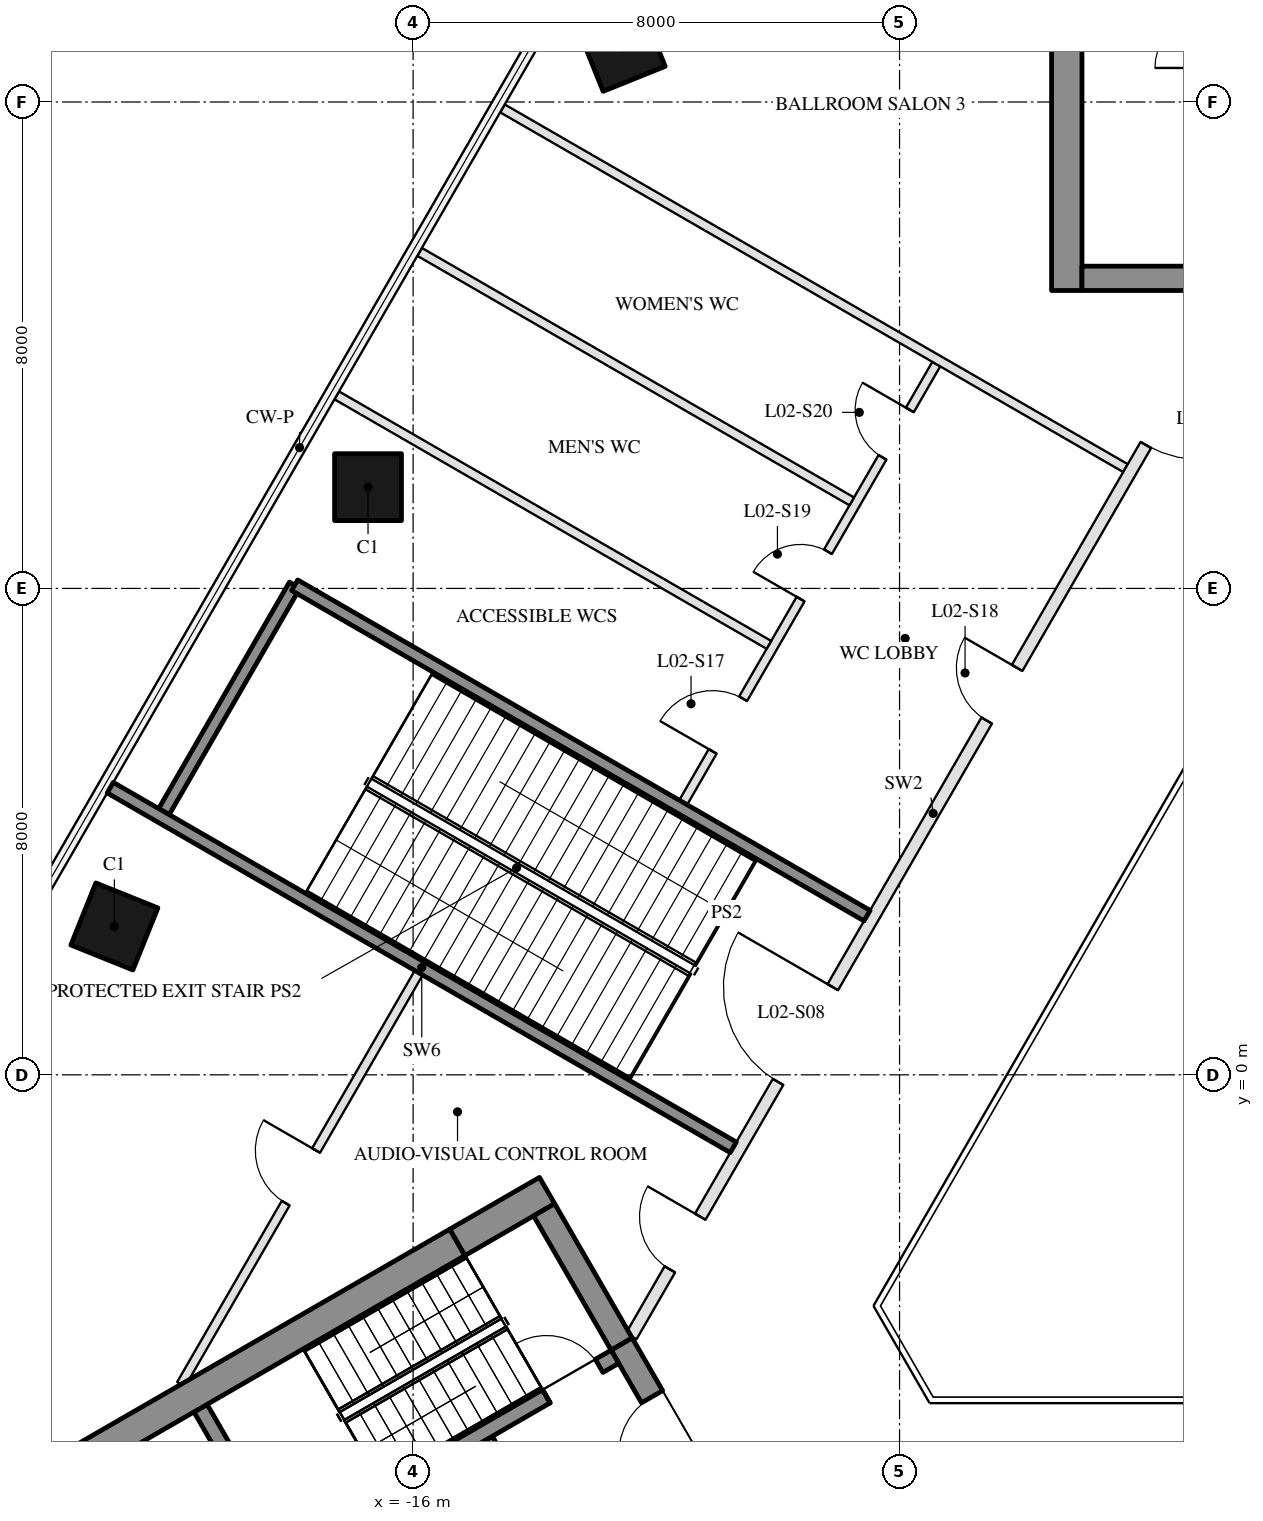
"""IFC4 building model, lengths in metres.
Left out: names, types, materials, properties, quantities, classifications, styles, units other than length and angle.
Written with IfcOpenShell. Run it as: python <this file> out.ifc"""

import sys

from ifc_helpers import new_model, si_unit, direction, frame, frame_2d, origin, origin_2d, place, context, subcontext, project, spatial, rectangle, hollow_rectangle, extrude, boolean, halfspace, element, fill, save


model = new_model("IFC4")
c1 = context("Model", 3, precision=1e-05, world=origin(), true_north=direction((0.0, 1.0)))
c2 = subcontext(c1, "Body", "Model", "MODEL_VIEW")
j1 = project(units=[si_unit("LENGTHUNIT", "METRE"), si_unit("PLANEANGLEUNIT", "RADIAN")], contexts=[c1])
p1 = place(None, origin())
s1 = spatial("IfcSite", under=j1, at=p1, CompositionType="ELEMENT")
p2 = place(p1, origin())
s2 = spatial("IfcBuilding", under=s1, at=p2, CompositionType="ELEMENT")
p3 = place(p2, frame((0.0, 0.0, 15.5)))
s3 = spatial("IfcBuildingStorey", under=s2, at=p3, CompositionType="ELEMENT", Elevation=15.5)
p4 = place(p3, frame((-12.57, 16.891, 0.0), z_axis=(0.054232459867, -0.069219344797, 0.996126258364), x_axis=(0.500873253526, 0.864897735693, 0.032831245724)))
e1 = element("IfcColumn", 1, at=p4, inside=s3, PredefinedType="COLUMN", context=c2, shape_type="SweptSolid", body=[
    boolean("DIFFERENCE", boolean("DIFFERENCE", extrude(hollow_rectangle(XDim=1.1, YDim=1.1, WallThickness=0.05, at=origin_2d()), origin(), (0.0, 0.0, 1.0), 8.031), halfspace(frame((0.0, 0.0, 0.016), z_axis=(0.0, 0.0, 1.0), x_axis=(1.0, 0.0, 0.0)), True)), halfspace(frame((0.0, 0.0, 8.017), z_axis=(0.0, 0.0, 1.0), x_axis=(1.0, 0.0, 0.0)), False)),
])
p5 = place(p3, frame((-16.741, 9.666, 0.0), z_axis=(0.070716365811, -0.040848206144, 0.996659731133), x_axis=(-0.500184519903, -0.865918844956, 0.0)))
e2 = element("IfcColumn", 2, at=p5, inside=s3, PredefinedType="COLUMN", context=c2, shape_type="SweptSolid", body=[
    boolean("DIFFERENCE", boolean("DIFFERENCE", extrude(hollow_rectangle(XDim=1.1, YDim=1.1, WallThickness=0.05, at=origin_2d()), origin(), (0.0, 0.0, 1.0), 8.027), halfspace(frame((0.0, 0.0, 0.015), z_axis=(0.0, 0.0, 1.0), x_axis=(1.0, 0.0, 0.0)), True)), halfspace(frame((0.0, 0.0, 8.013), z_axis=(0.0, 0.0, 1.0), x_axis=(1.0, 0.0, 0.0)), False)),
])
p6 = place(p3, frame((-20.913, 2.44, 0.0), z_axis=(0.087093940596, -0.012342108161, 0.996123645878), x_axis=(-0.498471453495, -0.866283513655, 0.032849414298)))
e3 = element("IfcColumn", 3, at=p6, inside=s3, PredefinedType="COLUMN", context=c2, shape_type="SweptSolid", body=[
    boolean("DIFFERENCE", boolean("DIFFERENCE", extrude(hollow_rectangle(XDim=1.1, YDim=1.1, WallThickness=0.05, at=origin_2d()), origin(), (0.0, 0.0, 1.0), 8.031), halfspace(frame((0.0, 0.0, 0.016), z_axis=(0.0, 0.0, 1.0), x_axis=(1.0, 0.0, 0.0)), True)), halfspace(frame((0.0, 0.0, 8.017), z_axis=(0.0, 0.0, 1.0), x_axis=(1.0, 0.0, 0.0)), False)),
])
p7 = place(p3, frame((-5.25, 12.9, 0.0), z_axis=(0.0, 0.0, 1.0), x_axis=(0.0, 1.0, 0.0)))
e4 = element("IfcWall", 4, at=p7, inside=s3, PredefinedType="SHEAR", context=c2, shape_type="SweptSolid", body=[
    extrude(rectangle(XDim=15.6, YDim=0.5, at=frame_2d((7.8, 0.0))), origin(), (0.0, 0.0, 1.0), 7.7),
])
p8 = place(p3, frame((2.45, 13.1, 0.0), z_axis=(0.0, 0.0, 1.0), x_axis=(-1.0, 0.0, 0.0)))
e5 = element("IfcWall", 5, at=p8, inside=s3, PredefinedType="SHEAR", context=c2, shape_type="SweptSolid", body=[
    extrude(rectangle(XDim=7.45, YDim=0.4, at=frame_2d((3.725, 0.0))), origin(), (0.0, 0.0, 1.0), 7.7),
])
p9 = place(p8, frame((1.0, 0.0, 0.0)))
e6 = element("IfcOpeningElement", 6, at=p9, cuts=e5, PredefinedType="OPENING", context=c2, shape_type="SweptSolid", body=[
    extrude(rectangle(XDim=1.1, YDim=2.1, at=frame_2d((0.55, 1.05))), frame((0.0, 0.21, 0.0), z_axis=(0.0, -1.0, 0.0), x_axis=(1.0, 0.0, 0.0)), (0.0, 0.0, 1.0), 0.42),
])
p10 = place(p8, frame((3.3, 0.0, 0.0)))
e7 = element("IfcOpeningElement", 7, at=p10, cuts=e5, PredefinedType="OPENING", context=c2, shape_type="SweptSolid", body=[
    extrude(rectangle(XDim=1.4, YDim=2.1, at=frame_2d((0.7, 1.05))), frame((0.0, 0.21, 0.0), z_axis=(0.0, -1.0, 0.0), x_axis=(1.0, 0.0, 0.0)), (0.0, 0.0, 1.0), 0.42),
])
p11 = place(p3, frame((-19.496, -5.482, 0.0), z_axis=(0.0, 0.0, 1.0), x_axis=(0.499990435942, -0.866030925526, 0.0)))
e8 = element("IfcWall", 8, at=p11, inside=s3, PredefinedType="SHEAR", context=c2, shape_type="SweptSolid", body=[
    extrude(rectangle(XDim=2.55, YDim=0.25, at=frame_2d((1.275, 0.0))), origin(), (0.0, 0.0, 1.0), 7.7),
])
p12 = place(p3, frame((-14.783, -5.995, 0.0), z_axis=(0.0, 0.0, 1.0), x_axis=(0.49994636267, -0.866056369097, 0.0)))
e9 = element("IfcWall", 9, at=p12, inside=s3, PredefinedType="SHEAR", context=c2, shape_type="SweptSolid", body=[
    extrude(rectangle(XDim=2.8, YDim=0.2, at=frame_2d((1.4, 0.0))), origin(), (0.0, 0.0, 1.0), 7.7),
])
p13 = place(p12, frame((0.7, 0.0, 0.0)))
e10 = element("IfcOpeningElement", 10, at=p13, cuts=e9, PredefinedType="OPENING", context=c2, shape_type="SweptSolid", body=[
    extrude(rectangle(XDim=1.2, YDim=2.1, at=frame_2d((0.6, 1.05))), frame((0.0, 0.11, 0.0), z_axis=(0.0, -1.0, 0.0), x_axis=(1.0, 0.0, 0.0)), (0.0, 0.0, 1.0), 0.22),
])
p14 = place(p3, frame((-13.797, -1.903, 0.0), z_axis=(0.0, 0.0, 1.0), x_axis=(-0.866033076574, -0.499986710104, 0.0)))
e11 = element("IfcWall", 11, at=p14, inside=s3, PredefinedType="SHEAR", context=c2, shape_type="SweptSolid", body=[
    extrude(rectangle(XDim=1.706, YDim=0.5, at=frame_2d((0.853, 0.0))), origin(), (0.0, 0.0, 1.0), 7.7),
])
p15 = place(p3, frame((-15.274, -2.756, 0.0), z_axis=(0.0, 0.0, 1.0), x_axis=(-0.86602318214, -0.500003847982, 0.0)))
e12 = element("IfcWall", 12, at=p15, inside=s3, PredefinedType="SHEAR", context=c2, shape_type="SweptSolid", body=[
    extrude(rectangle(XDim=13.894, YDim=0.5, at=frame_2d((6.947, 0.0))), origin(), (0.0, 0.0, 1.0), 7.7),
])
p16 = place(p3, frame((-13.845, -2.22, 0.0), z_axis=(0.0, 0.0, 1.0), x_axis=(0.500062241894, -0.865989465428, 0.0)))
e13 = element("IfcWall", 13, at=p16, inside=s3, PredefinedType="SHEAR", context=c2, shape_type="SweptSolid", body=[
    extrude(rectangle(XDim=2.55, YDim=0.4, at=frame_2d((1.275, 0.0))), origin(), (0.0, 0.0, 1.0), 7.7),
])
p17 = place(p3, frame((-12.57, -4.428, 0.0), z_axis=(0.0, 0.0, 1.0), x_axis=(0.499984378957, -0.86603442241, 0.0)))
e14 = element("IfcWall", 14, at=p17, inside=s3, PredefinedType="SHEAR", context=c2, shape_type="SweptSolid", body=[
    extrude(rectangle(XDim=7.45, YDim=0.4, at=frame_2d((3.725, 0.0))), origin(), (0.0, 0.0, 1.0), 7.7),
])
p18 = place(p17, frame((1.0, 0.0, 0.0)))
e15 = element("IfcOpeningElement", 15, at=p18, cuts=e14, PredefinedType="OPENING", context=c2, shape_type="SweptSolid", body=[
    extrude(rectangle(XDim=1.1, YDim=2.1, at=frame_2d((0.55, 1.05))), frame((0.0, 0.21, 0.0), z_axis=(0.0, -1.0, 0.0), x_axis=(1.0, 0.0, 0.0)), (0.0, 0.0, 1.0), 0.42),
])
p19 = place(p17, frame((3.3, 0.0, 0.0)))
e16 = element("IfcOpeningElement", 16, at=p19, cuts=e14, PredefinedType="OPENING", context=c2, shape_type="SweptSolid", body=[
    extrude(rectangle(XDim=1.4, YDim=2.1, at=frame_2d((0.7, 1.05))), frame((0.0, 0.21, 0.0), z_axis=(0.0, -1.0, 0.0), x_axis=(1.0, 0.0, 0.0)), (0.0, 0.0, 1.0), 0.42),
])
p20 = place(p3, frame((-12.681, -4.636, 0.0), z_axis=(0.0, 0.0, 1.0), x_axis=(-0.86601437931, -0.500019094464, 0.0)))
e17 = element("IfcWall", 17, at=p20, inside=s3, PredefinedType="SHEAR", context=c2, shape_type="SweptSolid", body=[
    extrude(rectangle(XDim=1.306, YDim=0.25, at=frame_2d((0.653, 0.0))), origin(), (0.0, 0.0, 1.0), 7.7),
])
p21 = place(p20, frame((0.3, 0.0, 0.0)))
e18 = element("IfcOpeningElement", 18, at=p21, cuts=e17, PredefinedType="OPENING", context=c2, shape_type="SweptSolid", body=[
    extrude(rectangle(XDim=1.0, YDim=2.1, at=frame_2d((0.5, 1.05))), frame((0.0, 0.135, 0.0), z_axis=(0.0, -1.0, 0.0), x_axis=(1.0, 0.0, 0.0)), (0.0, 0.0, 1.0), 0.27),
])
p22 = place(p3, frame((-13.812, -5.29, 0.0), z_axis=(0.0, 0.0, 1.0), x_axis=(-0.866023561601, -0.500003190742, 0.0)))
e19 = element("IfcWall", 19, at=p22, inside=s3, PredefinedType="SHEAR", context=c2, shape_type="SweptSolid", body=[
    extrude(rectangle(XDim=5.144, YDim=0.25, at=frame_2d((2.572, 0.0))), origin(), (0.0, 0.0, 1.0), 7.7),
])
p23 = place(p3, frame((-17.948, 8.053, 0.0), z_axis=(0.0, 0.0, 1.0), x_axis=(-0.500028799954, -0.866008775485, 0.0)))
e20 = element("IfcWall", 20, at=p23, inside=s3, PredefinedType="SOLIDWALL", context=c2, shape_type="SweptSolid", body=[
    extrude(rectangle(XDim=4.3, YDim=0.2, at=frame_2d((2.15, 0.0))), origin(), (0.0, 0.0, 1.0), 7.7),
])
p24 = place(p3, frame((-15.908, 1.679, 0.0), z_axis=(0.0, 0.0, 1.0), x_axis=(-0.49997934671, -0.866037327638, 0.0)))
e21 = element("IfcWall", 21, at=p24, inside=s3, PredefinedType="PARTITIONING", context=c2, shape_type="SweptSolid", body=[
    extrude(rectangle(XDim=7.815, YDim=0.15, at=frame_2d((3.908, 0.0))), origin(), (0.0, 0.0, 1.0), 6.91),
])
p25 = place(p24, frame((3.375, 0.0, 0.0)))
e22 = element("IfcOpeningElement", 22, at=p25, cuts=e21, PredefinedType="OPENING", context=c2, shape_type="SweptSolid", body=[
    extrude(rectangle(XDim=1.0, YDim=2.1, at=frame_2d((0.5, 1.05))), frame((0.0, 0.085, 0.0), z_axis=(0.0, -1.0, 0.0), x_axis=(1.0, 0.0, 0.0)), (0.0, 0.0, 1.0), 0.17),
])
p26 = place(p3, frame((-7.396, 11.689, 0.0), z_axis=(0.0, 0.0, 1.0), x_axis=(-0.500005920892, -0.866021985329, 0.0)))
e23 = element("IfcWall", 23, at=p26, inside=s3, PredefinedType="PARTITIONING", context=c2, shape_type="SweptSolid", body=[
    extrude(rectangle(XDim=8.325, YDim=0.15, at=frame_2d((4.163, 0.0))), origin(), (0.0, 0.0, 1.0), 6.91),
])
p27 = place(p26, frame((6.354, 0.0, 0.0)))
e24 = element("IfcOpeningElement", 24, at=p27, cuts=e23, PredefinedType="OPENING", context=c2, shape_type="SweptSolid", body=[
    extrude(rectangle(XDim=1.0, YDim=2.1, at=frame_2d((0.5, 1.05))), frame((0.0, 0.085, 0.0), z_axis=(0.0, -1.0, 0.0), x_axis=(1.0, 0.0, 0.0)), (0.0, 0.0, 1.0), 0.17),
])
p28 = place(p26, frame((3.562, 0.0, 0.0)))
e25 = element("IfcOpeningElement", 25, at=p28, cuts=e23, PredefinedType="OPENING", context=c2, shape_type="SweptSolid", body=[
    extrude(rectangle(XDim=0.9, YDim=2.1, at=frame_2d((0.45, 1.05))), frame((0.0, 0.085, 0.0), z_axis=(0.0, -1.0, 0.0), x_axis=(1.0, 0.0, 0.0)), (0.0, 0.0, 1.0), 0.17),
])
p29 = place(p26, frame((0.871, 0.0, 0.0)))
e26 = element("IfcOpeningElement", 26, at=p29, cuts=e23, PredefinedType="OPENING", context=c2, shape_type="SweptSolid", body=[
    extrude(rectangle(XDim=0.9, YDim=2.1, at=frame_2d((0.45, 1.05))), frame((0.0, 0.085, 0.0), z_axis=(0.0, -1.0, 0.0), x_axis=(1.0, 0.0, 0.0)), (0.0, 0.0, 1.0), 0.17),
])
p30 = place(p3, frame((-14.531, 15.895, 0.0), z_axis=(0.0, 0.0, 1.0), x_axis=(0.866032672044, -0.499987410794, 0.0)))
e27 = element("IfcWall", 27, at=p30, inside=s3, PredefinedType="PARTITIONING", context=c2, shape_type="SweptSolid", body=[
    extrude(rectangle(XDim=11.831, YDim=0.15, at=frame_2d((5.916, 0.0))), origin(), (0.0, 0.0, 1.0), 7.1),
])
for number, where, z_axis, x_axis in (
    (28, (-15.893, 13.535, 0.0), (0.0, 0.0, 1.0), (0.866, -0.5, 0.0)),
    (29, (-17.256, 11.175, 0.0), (0.0, 0.0, 1.0), (0.866, -0.5, 0.0)),
):
    element("IfcWall", number, at=place(p3, frame(where, z_axis=z_axis, x_axis=x_axis)), inside=s3, PredefinedType="PARTITIONING", context=c2, shape_type="SweptSolid", body=[
        extrude(rectangle(XDim=8.207, YDim=0.15, at=frame_2d((4.104, 0.0))), origin(), (0.0, 0.0, 1.0), 7.1),
    ])
p31 = place(p3, frame((-17.948, 8.053, 0.0), z_axis=(0.0, 0.0, 1.0), x_axis=(0.86602026553, -0.500008899612, 0.0)))
e30 = element("IfcWall", 30, at=p31, inside=s3, PredefinedType="SOLIDWALL", context=c2, shape_type="SweptSolid", body=[
    extrude(rectangle(XDim=10.87, YDim=0.2, at=frame_2d((5.435, 0.0))), origin(), (0.0, 0.0, 1.0), 7.7),
])
p32 = place(p3, frame((-20.981, 4.723, 0.0), z_axis=(0.0, 0.0, 1.0), x_axis=(0.866023736906, -0.500002887107, 0.0)))
e31 = element("IfcWall", 31, at=p32, inside=s3, PredefinedType="SOLIDWALL", context=c2, shape_type="SweptSolid", body=[
    extrude(rectangle(XDim=11.832, YDim=0.2, at=frame_2d((5.916, 0.0))), origin(), (0.0, 0.0, 1.0), 7.7),
])
p33 = place(p3, frame((-2.482, 12.9, 0.0), z_axis=(0.0, 0.0, 1.0), x_axis=(-0.50000478328, -0.866022642139, 0.0)))
e32 = element("IfcWall", 32, at=p33, inside=s3, PredefinedType="PARTITIONING", context=c2, shape_type="SweptSolid", body=[
    extrude(rectangle(XDim=19.861, YDim=0.2, at=frame_2d((9.931, 0.0))), origin(), (0.0, 0.0, 1.0), 6.91),
])
p34 = place(p33, frame((13.23, 0.0, 0.0)))
e33 = element("IfcOpeningElement", 33, at=p34, cuts=e32, PredefinedType="OPENING", context=c2, shape_type="SweptSolid", body=[
    extrude(rectangle(XDim=1.8, YDim=2.1, at=frame_2d((0.9, 1.05))), frame((0.0, 0.11, 0.0), z_axis=(0.0, -1.0, 0.0), x_axis=(1.0, 0.0, 0.0)), (0.0, 0.0, 1.0), 0.22),
])
p35 = place(p33, frame((1.134, 0.0, 0.0)))
e34 = element("IfcOpeningElement", 34, at=p35, cuts=e32, PredefinedType="OPENING", context=c2, shape_type="SweptSolid", body=[
    extrude(rectangle(XDim=1.8, YDim=2.4, at=frame_2d((0.9, 1.2))), frame((0.0, 0.11, 0.0), z_axis=(0.0, -1.0, 0.0), x_axis=(1.0, 0.0, 0.0)), (0.0, 0.0, 1.0), 0.22),
])
p36 = place(p33, frame((17.59, 0.0, 0.0)))
e35 = element("IfcOpeningElement", 35, at=p36, cuts=e32, PredefinedType="OPENING", context=c2, shape_type="SweptSolid", body=[
    extrude(rectangle(XDim=1.0, YDim=2.1, at=frame_2d((0.5, 1.05))), frame((0.0, 0.11, 0.0), z_axis=(0.0, -1.0, 0.0), x_axis=(1.0, 0.0, 0.0)), (0.0, 0.0, 1.0), 0.22),
])
p37 = place(p33, frame((7.168, 0.0, 0.0)))
e36 = element("IfcOpeningElement", 36, at=p37, cuts=e32, PredefinedType="OPENING", context=c2, shape_type="SweptSolid", body=[
    extrude(rectangle(XDim=1.0, YDim=2.1, at=frame_2d((0.5, 1.05))), frame((0.0, 0.11, 0.0), z_axis=(0.0, -1.0, 0.0), x_axis=(1.0, 0.0, 0.0)), (0.0, 0.0, 1.0), 0.22),
])
p38 = place(p18, frame((1.1, 0.0, 0.0), z_axis=(0.0, 0.0, 1.0), x_axis=(-1.0, 0.0, 0.0)))
e37 = element("IfcDoor", 37, at=p38, inside=s3, OperationType="SINGLE_SWING_LEFT", PredefinedType="DOOR", context=c2, shape_type="SweptSolid", body=[
    extrude(rectangle(XDim=1.1, YDim=2.1, at=frame_2d((0.55, 1.05))), frame((0.0, 0.025, 0.0), z_axis=(0.0, -1.0, 0.0), x_axis=(1.0, 0.0, 0.0)), (0.0, 0.0, 1.0), 0.05),
])
fill(e15, e37)
p39 = place(p21, frame((1.0, 0.0, 0.0), z_axis=(0.0, 0.0, 1.0), x_axis=(-1.0, 0.0, 0.0)))
e38 = element("IfcDoor", 38, at=p39, inside=s3, OperationType="SINGLE_SWING_LEFT", PredefinedType="DOOR", context=c2, shape_type="SweptSolid", body=[
    extrude(rectangle(XDim=1.0, YDim=2.1, at=frame_2d((0.5, 1.05))), frame((0.0, 0.025, 0.0), z_axis=(0.0, -1.0, 0.0), x_axis=(1.0, 0.0, 0.0)), (0.0, 0.0, 1.0), 0.05),
])
fill(e18, e38)
p40 = place(p34, frame((1.8, 0.0, 0.0), z_axis=(0.0, 0.0, 1.0), x_axis=(-1.0, 0.0, 0.0)))
e39 = element("IfcDoor", 39, at=p40, inside=s3, OperationType="DOUBLE_DOOR_SINGLE_SWING", PredefinedType="DOOR", context=c2, shape_type="SweptSolid", body=[
    extrude(rectangle(XDim=1.8, YDim=2.1, at=frame_2d((0.9, 1.05))), frame((0.0, 0.025, 0.0), z_axis=(0.0, -1.0, 0.0), x_axis=(1.0, 0.0, 0.0)), (0.0, 0.0, 1.0), 0.05),
])
fill(e33, e39)
p41 = place(p35, origin())
e40 = element("IfcDoor", 40, at=p41, inside=s3, OperationType="DOUBLE_DOOR_SINGLE_SWING", PredefinedType="DOOR", context=c2, shape_type="SweptSolid", body=[
    extrude(rectangle(XDim=1.8, YDim=2.4, at=frame_2d((0.9, 1.2))), frame((0.0, 0.025, 0.0), z_axis=(0.0, -1.0, 0.0), x_axis=(1.0, 0.0, 0.0)), (0.0, 0.0, 1.0), 0.05),
])
fill(e34, e40)
p42 = place(p36, frame((1.0, 0.0, 0.0), z_axis=(0.0, 0.0, 1.0), x_axis=(-1.0, 0.0, 0.0)))
e41 = element("IfcDoor", 41, at=p42, inside=s3, OperationType="SINGLE_SWING_RIGHT", PredefinedType="DOOR", context=c2, shape_type="SweptSolid", body=[
    extrude(rectangle(XDim=1.0, YDim=2.1, at=frame_2d((0.5, 1.05))), frame((0.0, 0.025, 0.0), z_axis=(0.0, -1.0, 0.0), x_axis=(1.0, 0.0, 0.0)), (0.0, 0.0, 1.0), 0.05),
])
fill(e35, e41)
p43 = place(p25, frame((1.0, 0.0, 0.0), z_axis=(0.0, 0.0, 1.0), x_axis=(-1.0, 0.0, 0.0)))
e42 = element("IfcDoor", 42, at=p43, inside=s3, OperationType="SINGLE_SWING_RIGHT", PredefinedType="DOOR", context=c2, shape_type="SweptSolid", body=[
    extrude(rectangle(XDim=1.0, YDim=2.1, at=frame_2d((0.5, 1.05))), frame((0.0, 0.025, 0.0), z_axis=(0.0, -1.0, 0.0), x_axis=(1.0, 0.0, 0.0)), (0.0, 0.0, 1.0), 0.05),
])
fill(e22, e42)
p44 = place(p27, frame((1.0, 0.0, 0.0), z_axis=(0.0, 0.0, 1.0), x_axis=(-1.0, 0.0, 0.0)))
e43 = element("IfcDoor", 43, at=p44, inside=s3, OperationType="SINGLE_SWING_LEFT", PredefinedType="DOOR", context=c2, shape_type="SweptSolid", body=[
    extrude(rectangle(XDim=1.0, YDim=2.1, at=frame_2d((0.5, 1.05))), frame((0.0, 0.025, 0.0), z_axis=(0.0, -1.0, 0.0), x_axis=(1.0, 0.0, 0.0)), (0.0, 0.0, 1.0), 0.05),
])
fill(e24, e43)
p45 = place(p37, frame((1.0, 0.0, 0.0), z_axis=(0.0, 0.0, 1.0), x_axis=(-1.0, 0.0, 0.0)))
e44 = element("IfcDoor", 44, at=p45, inside=s3, OperationType="SINGLE_SWING_RIGHT", PredefinedType="DOOR", context=c2, shape_type="SweptSolid", body=[
    extrude(rectangle(XDim=1.0, YDim=2.1, at=frame_2d((0.5, 1.05))), frame((0.0, 0.025, 0.0), z_axis=(0.0, -1.0, 0.0), x_axis=(1.0, 0.0, 0.0)), (0.0, 0.0, 1.0), 0.05),
])
fill(e36, e44)
p46 = place(p28, frame((0.9, 0.0, 0.0), z_axis=(0.0, 0.0, 1.0), x_axis=(-1.0, 0.0, 0.0)))
e45 = element("IfcDoor", 45, at=p46, inside=s3, OperationType="SINGLE_SWING_LEFT", PredefinedType="DOOR", context=c2, shape_type="SweptSolid", body=[
    extrude(rectangle(XDim=0.9, YDim=2.1, at=frame_2d((0.45, 1.05))), frame((0.0, 0.025, 0.0), z_axis=(0.0, -1.0, 0.0), x_axis=(1.0, 0.0, 0.0)), (0.0, 0.0, 1.0), 0.05),
])
fill(e25, e45)
p47 = place(p29, frame((0.9, 0.0, 0.0), z_axis=(0.0, 0.0, 1.0), x_axis=(-1.0, 0.0, 0.0)))
e46 = element("IfcDoor", 46, at=p47, inside=s3, OperationType="SINGLE_SWING_RIGHT", PredefinedType="DOOR", context=c2, shape_type="SweptSolid", body=[
    extrude(rectangle(XDim=0.9, YDim=2.1, at=frame_2d((0.45, 1.05))), frame((0.0, 0.025, 0.0), z_axis=(0.0, -1.0, 0.0), x_axis=(1.0, 0.0, 0.0)), (0.0, 0.0, 1.0), 0.05),
])
fill(e26, e46)
save(model, sys.argv[1])
